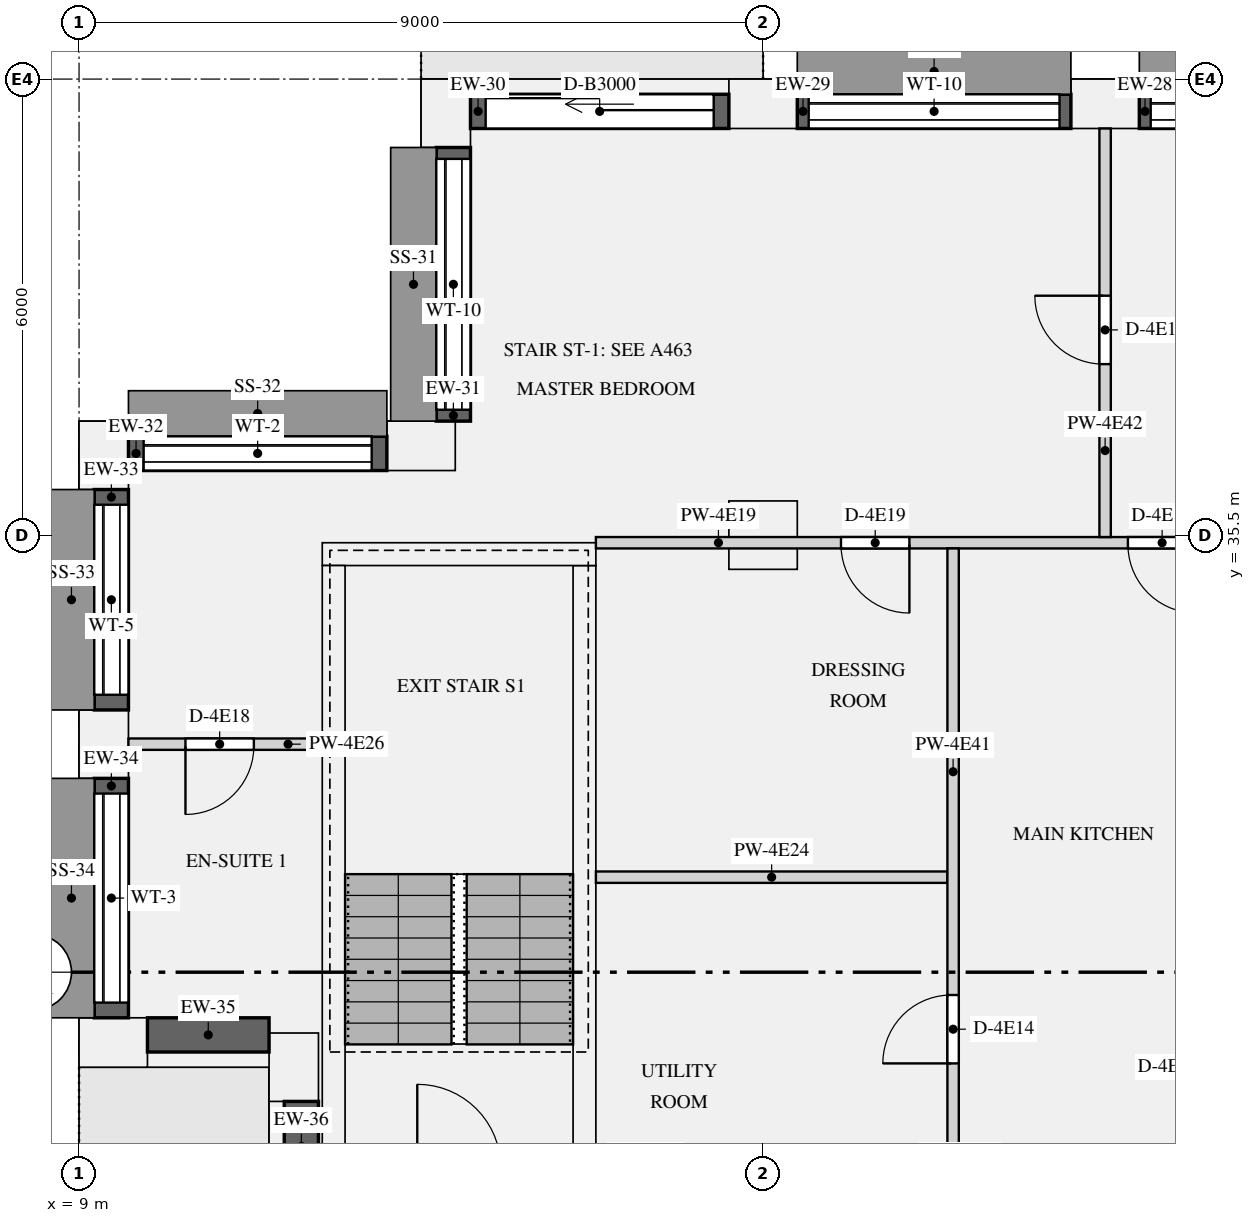
"""IFC4 building model, lengths in metres.
Left out: names, types, materials, properties, quantities, classifications, styles, units other than length and angle.
Written with IfcOpenShell. Run it as: python <this file> out.ifc"""

import sys

from ifc_helpers import new_model, si_unit, direction, frame, frame_2d, origin, origin_2d, place, context, subcontext, project, spatial, rectangle, extrude, element, fill, save


model = new_model("IFC4")
c1 = context("Model", 3, precision=1e-05, world=origin(), true_north=direction((0.0, 1.0)))
c2 = subcontext(c1, "Body", "Model", "MODEL_VIEW")
j1 = project(units=[si_unit("LENGTHUNIT", "METRE"), si_unit("PLANEANGLEUNIT", "RADIAN")], contexts=[c1])
p1 = place(None, origin())
s1 = spatial("IfcSite", under=j1, at=p1, CompositionType="ELEMENT")
p2 = place(p1, origin())
s2 = spatial("IfcBuilding", under=s1, at=p2, CompositionType="ELEMENT")
p3 = place(p2, frame((0.0, 0.0, 232.65)))
s3 = spatial("IfcBuildingStorey", under=s2, at=p3, CompositionType="ELEMENT", Elevation=232.65)
for number, where, z_axis, x_axis in (
    (1, (22.5, 41.175, 0.0), (0.0, 0.0, 1.0), (-1.0, 0.0, 0.0)),
    (2, (18.0, 41.175, 0.0), (0.0, 0.0, 1.0), (-1.0, 0.0, 0.0)),
    (3, (13.825, 41.05, 0.0), (0.0, 0.0, 1.0), (0.0, -1.0, 0.0)),
    (4, (13.5, 36.675, 0.0), (0.0, 0.0, 1.0), (-1.0, 0.0, 0.0)),
    (5, (9.325, 36.55, 0.0), (0.0, 0.0, 1.0), (0.0, -1.0, 0.0)),
    (6, (9.325, 32.75, 0.0), (0.0, 0.0, 1.0), (0.0, -1.0, 0.0)),
    (7, (9.45, 28.825, 0.0), (0.0, 0.0, 1.0), (1.0, 0.0, 0.0)),
    (8, (11.825, 28.5, 0.0), (0.0, 0.0, 1.0), (0.0, -1.0, 0.0)),
):
    element("IfcColumn", number, at=place(p3, frame(where, z_axis=z_axis, x_axis=x_axis)), inside=s3, PredefinedType="USERDEFINED", context=c2, shape_type="SweptSolid", body=[
        extrude(rectangle(XDim=0.9, YDim=0.65, at=origin_2d()), origin(), (0.0, 0.0, 1.0), 3.15),
    ])
p4 = place(p3, frame((18.0, 35.5, 0.0), z_axis=(0.0, 0.0, 1.0), x_axis=(1.0, 0.0, 0.0)))
e9 = element("IfcColumn", 9, at=p4, inside=s3, PredefinedType="COLUMN", context=c2, shape_type="SweptSolid", body=[
    extrude(rectangle(XDim=0.9, YDim=0.9, at=origin_2d()), origin(), (0.0, 0.0, 1.0), 3.15),
])
p5 = place(p3, frame((12.2, 35.25, 0.0), z_axis=(0.0, 0.0, 1.0), x_axis=(1.0, 0.0, 0.0)))
e10 = element("IfcWall", 10, at=p5, inside=s3, PredefinedType="SHEAR", context=c2, shape_type="SweptSolid", body=[
    extrude(rectangle(XDim=3.6, YDim=0.3, at=frame_2d((1.8, 0.0))), origin(), (0.0, 0.0, 1.0), 3.15),
])
for number, where, z_axis, x_axis in (
    (11, (12.35, 27.3, 0.0), (0.0, 0.0, 1.0), (0.0, 1.0, 0.0)),
    (12, (15.65, 27.3, 0.0), (0.0, 0.0, 1.0), (0.0, 1.0, 0.0)),
):
    element("IfcWall", number, at=place(p3, frame(where, z_axis=z_axis, x_axis=x_axis)), inside=s3, PredefinedType="SHEAR", context=c2, shape_type="SweptSolid", body=[
        extrude(rectangle(XDim=7.8, YDim=0.3, at=frame_2d((3.9, 0.0))), origin(), (0.0, 0.0, 1.0), 3.15),
    ])
p6 = place(p3, frame((26.55, 41.075, 0.9), z_axis=(0.0, 0.0, 1.0), x_axis=(-1.0, 0.0, 0.0)))
e13 = element("IfcWall", 13, at=p6, inside=s3, PredefinedType="SOLIDWALL", context=c2, shape_type="SweptSolid", body=[
    extrude(rectangle(XDim=3.6, YDim=0.45, at=frame_2d((1.8, 0.0))), origin(), (0.0, 0.0, 1.0), 1.9),
])
p7 = place(p6, frame((0.15, 0.0, 0.15)))
e14 = element("IfcOpeningElement", 14, at=p7, cuts=e13, PredefinedType="OPENING", context=c2, shape_type="SweptSolid", body=[
    extrude(rectangle(XDim=3.3, YDim=1.5, at=frame_2d((1.65, 0.75))), frame((0.0, 0.235, 0.0), z_axis=(0.0, -1.0, 0.0), x_axis=(1.0, 0.0, 0.0)), (0.0, 0.0, 1.0), 0.47),
])
p8 = place(p3, frame((22.05, 41.075, 0.9), z_axis=(0.0, 0.0, 1.0), x_axis=(-1.0, 0.0, 0.0)))
e15 = element("IfcWall", 15, at=p8, inside=s3, PredefinedType="SOLIDWALL", context=c2, shape_type="SweptSolid", body=[
    extrude(rectangle(XDim=3.6, YDim=0.45, at=frame_2d((1.8, 0.0))), origin(), (0.0, 0.0, 1.0), 1.9),
])
p9 = place(p8, frame((0.15, 0.0, 0.15)))
e16 = element("IfcOpeningElement", 16, at=p9, cuts=e15, PredefinedType="OPENING", context=c2, shape_type="SweptSolid", body=[
    extrude(rectangle(XDim=3.3, YDim=1.5, at=frame_2d((1.65, 0.75))), frame((0.0, 0.235, 0.0), z_axis=(0.0, -1.0, 0.0), x_axis=(1.0, 0.0, 0.0)), (0.0, 0.0, 1.0), 0.47),
])
p10 = place(p3, frame((17.55, 41.075, 0.0), z_axis=(0.0, 0.0, 1.0), x_axis=(-1.0, 0.0, 0.0)))
e17 = element("IfcWall", 17, at=p10, inside=s3, PredefinedType="SOLIDWALL", context=c2, shape_type="SweptSolid", body=[
    extrude(rectangle(XDim=3.4, YDim=0.45, at=frame_2d((1.7, 0.0))), origin(), (0.0, 0.0, 1.0), 2.8),
])
p11 = place(p10, frame((0.2, 0.0, 0.0)))
e18 = element("IfcOpeningElement", 18, at=p11, cuts=e17, PredefinedType="OPENING", context=c2, shape_type="SweptSolid", body=[
    extrude(rectangle(XDim=3.0, YDim=2.3, at=frame_2d((1.5, 1.15))), frame((0.0, 0.235, 0.0), z_axis=(0.0, -1.0, 0.0), x_axis=(1.0, 0.0, 0.0)), (0.0, 0.0, 1.0), 0.47),
])
p12 = place(p3, frame((13.925, 40.6, 0.9), z_axis=(0.0, 0.0, 1.0), x_axis=(0.0, -1.0, 0.0)))
e19 = element("IfcWall", 19, at=p12, inside=s3, PredefinedType="SOLIDWALL", context=c2, shape_type="SweptSolid", body=[
    extrude(rectangle(XDim=3.6, YDim=0.45, at=frame_2d((1.8, 0.0))), origin(), (0.0, 0.0, 1.0), 1.9),
])
p13 = place(p12, frame((0.15, 0.0, 0.15)))
e20 = element("IfcOpeningElement", 20, at=p13, cuts=e19, PredefinedType="OPENING", context=c2, shape_type="SweptSolid", body=[
    extrude(rectangle(XDim=3.3, YDim=1.5, at=frame_2d((1.65, 0.75))), frame((0.0, 0.235, 0.0), z_axis=(0.0, -1.0, 0.0), x_axis=(1.0, 0.0, 0.0)), (0.0, 0.0, 1.0), 0.47),
])
p14 = place(p3, frame((13.05, 36.575, 0.9), z_axis=(0.0, 0.0, 1.0), x_axis=(-1.0, 0.0, 0.0)))
e21 = element("IfcWall", 21, at=p14, inside=s3, PredefinedType="SOLIDWALL", context=c2, shape_type="SweptSolid", body=[
    extrude(rectangle(XDim=3.4, YDim=0.45, at=frame_2d((1.7, 0.0))), origin(), (0.0, 0.0, 1.0), 1.9),
])
p15 = place(p14, frame((0.2, 0.0, 0.15)))
e22 = element("IfcOpeningElement", 22, at=p15, cuts=e21, PredefinedType="OPENING", context=c2, shape_type="SweptSolid", body=[
    extrude(rectangle(XDim=3.0, YDim=1.5, at=frame_2d((1.5, 0.75))), frame((0.0, 0.235, 0.0), z_axis=(0.0, -1.0, 0.0), x_axis=(1.0, 0.0, 0.0)), (0.0, 0.0, 1.0), 0.47),
])
p16 = place(p3, frame((9.425, 36.1, 0.9), z_axis=(0.0, 0.0, 1.0), x_axis=(0.0, -1.0, 0.0)))
e23 = element("IfcWall", 23, at=p16, inside=s3, PredefinedType="SOLIDWALL", context=c2, shape_type="SweptSolid", body=[
    extrude(rectangle(XDim=2.9, YDim=0.45, at=frame_2d((1.45, 0.0))), origin(), (0.0, 0.0, 1.0), 1.9),
])
p17 = place(p16, frame((0.2, 0.0, 0.15)))
e24 = element("IfcOpeningElement", 24, at=p17, cuts=e23, PredefinedType="OPENING", context=c2, shape_type="SweptSolid", body=[
    extrude(rectangle(XDim=2.5, YDim=1.5, at=frame_2d((1.25, 0.75))), frame((0.0, 0.235, 0.0), z_axis=(0.0, -1.0, 0.0), x_axis=(1.0, 0.0, 0.0)), (0.0, 0.0, 1.0), 0.47),
])
p18 = place(p3, frame((9.425, 32.3, 0.9), z_axis=(0.0, 0.0, 1.0), x_axis=(0.0, -1.0, 0.0)))
e25 = element("IfcWall", 25, at=p18, inside=s3, PredefinedType="SOLIDWALL", context=c2, shape_type="SweptSolid", body=[
    extrude(rectangle(XDim=3.15, YDim=0.45, at=frame_2d((1.575, 0.0))), origin(), (0.0, 0.0, 1.0), 1.9),
])
p19 = place(p18, frame((0.2, 0.0, 0.15)))
e26 = element("IfcOpeningElement", 26, at=p19, cuts=e25, PredefinedType="OPENING", context=c2, shape_type="SweptSolid", body=[
    extrude(rectangle(XDim=2.75, YDim=1.5, at=frame_2d((1.375, 0.75))), frame((0.0, 0.235, 0.0), z_axis=(0.0, -1.0, 0.0), x_axis=(1.0, 0.0, 0.0)), (0.0, 0.0, 1.0), 0.47),
])
p20 = place(p3, frame((9.9, 28.925, 0.9), z_axis=(0.0, 0.0, 1.0), x_axis=(1.0, 0.0, 0.0)))
e27 = element("IfcWall", 27, at=p20, inside=s3, PredefinedType="SOLIDWALL", context=c2, shape_type="SweptSolid", body=[
    extrude(rectangle(XDim=1.6, YDim=0.45, at=frame_2d((0.8, 0.0))), origin(), (0.0, 0.0, 1.0), 1.9),
])
p21 = place(p3, frame((11.925, 28.05, 0.0), z_axis=(0.0, 0.0, 1.0), x_axis=(0.0, -1.0, 0.0)))
e28 = element("IfcWall", 28, at=p21, inside=s3, PredefinedType="SOLIDWALL", context=c2, shape_type="SweptSolid", body=[
    extrude(rectangle(XDim=3.1, YDim=0.45, at=frame_2d((1.55, 0.0))), origin(), (0.0, 0.0, 1.0), 2.8),
])
p22 = place(p21, frame((1.185, 0.0, 0.0)))
e29 = element("IfcOpeningElement", 29, at=p22, cuts=e28, PredefinedType="OPENING", context=c2, shape_type="SweptSolid", body=[
    extrude(rectangle(XDim=1.75, YDim=2.3, at=frame_2d((0.875, 1.15))), frame((0.0, 0.235, 0.0), z_axis=(0.0, -1.0, 0.0), x_axis=(1.0, 0.0, 0.0)), (0.0, 0.0, 1.0), 0.47),
])
p23 = place(p3, frame((15.8, 35.4, 0.0), z_axis=(0.0, 0.0, 1.0), x_axis=(1.0, 0.0, 0.0)))
e30 = element("IfcWall", 30, at=p23, inside=s3, PredefinedType="PARTITIONING", context=c2, shape_type="SweptSolid", body=[
    extrude(rectangle(XDim=11.2, YDim=0.15, at=frame_2d((5.6, 0.0))), origin(), (0.0, 0.0, 1.0), 2.8),
])
p24 = place(p23, frame((8.725, 0.0, 0.0)))
e31 = element("IfcOpeningElement", 31, at=p24, cuts=e30, PredefinedType="OPENING", context=c2, shape_type="SweptSolid", body=[
    extrude(rectangle(XDim=1.5, YDim=2.1, at=frame_2d((0.75, 1.05))), frame((0.0, 0.085, 0.0), z_axis=(0.0, -1.0, 0.0), x_axis=(1.0, 0.0, 0.0)), (0.0, 0.0, 1.0), 0.17),
])
p25 = place(p23, frame((7.0, 0.0, 0.0)))
e32 = element("IfcOpeningElement", 32, at=p25, cuts=e30, PredefinedType="OPENING", context=c2, shape_type="SweptSolid", body=[
    extrude(rectangle(XDim=0.9, YDim=2.1, at=frame_2d((0.45, 1.05))), frame((0.0, 0.085, 0.0), z_axis=(0.0, -1.0, 0.0), x_axis=(1.0, 0.0, 0.0)), (0.0, 0.0, 1.0), 0.17),
])
p26 = place(p23, frame((3.225, 0.0, 0.0)))
e33 = element("IfcOpeningElement", 33, at=p26, cuts=e30, PredefinedType="OPENING", context=c2, shape_type="SweptSolid", body=[
    extrude(rectangle(XDim=0.9, YDim=2.1, at=frame_2d((0.45, 1.05))), frame((0.0, 0.085, 0.0), z_axis=(0.0, -1.0, 0.0), x_axis=(1.0, 0.0, 0.0)), (0.0, 0.0, 1.0), 0.17),
])
p27 = place(p3, frame((15.8, 31.0, 0.0), z_axis=(0.0, 0.0, 1.0), x_axis=(1.0, 0.0, 0.0)))
e34 = element("IfcWall", 34, at=p27, inside=s3, PredefinedType="PARTITIONING", context=c2, shape_type="SweptSolid", body=[
    extrude(rectangle(XDim=4.625, YDim=0.15, at=frame_2d((2.312, 0.0))), origin(), (0.0, 0.0, 1.0), 2.8),
])
p28 = place(p3, frame((9.65, 32.75, 0.0), z_axis=(0.0, 0.0, 1.0), x_axis=(1.0, 0.0, 0.0)))
e35 = element("IfcWall", 35, at=p28, inside=s3, PredefinedType="PARTITIONING", context=c2, shape_type="SweptSolid", body=[
    extrude(rectangle(XDim=2.55, YDim=0.15, at=frame_2d((1.275, 0.0))), origin(), (0.0, 0.0, 1.0), 2.8),
])
p29 = place(p28, frame((0.75, 0.0, 0.0)))
e36 = element("IfcOpeningElement", 36, at=p29, cuts=e35, PredefinedType="OPENING", context=c2, shape_type="SweptSolid", body=[
    extrude(rectangle(XDim=0.9, YDim=2.1, at=frame_2d((0.45, 1.05))), frame((0.0, 0.085, 0.0), z_axis=(0.0, -1.0, 0.0), x_axis=(1.0, 0.0, 0.0)), (0.0, 0.0, 1.0), 0.17),
])
p30 = place(p3, frame((20.5, 27.1, 0.0), z_axis=(0.0, 0.0, 1.0), x_axis=(0.0, 1.0, 0.0)))
e37 = element("IfcWall", 37, at=p30, inside=s3, PredefinedType="PARTITIONING", context=c2, shape_type="SweptSolid", body=[
    extrude(rectangle(XDim=8.225, YDim=0.15, at=frame_2d((4.112, 0.0))), origin(), (0.0, 0.0, 1.0), 2.8),
])
p31 = place(p30, frame((1.45, 0.0, 0.0)))
e38 = element("IfcOpeningElement", 38, at=p31, cuts=e37, PredefinedType="OPENING", context=c2, shape_type="SweptSolid", body=[
    extrude(rectangle(XDim=0.9, YDim=2.1, at=frame_2d((0.45, 1.05))), frame((0.0, 0.085, 0.0), z_axis=(0.0, -1.0, 0.0), x_axis=(1.0, 0.0, 0.0)), (0.0, 0.0, 1.0), 0.17),
])
p32 = place(p3, frame((22.5, 35.475, 0.0), z_axis=(0.0, 0.0, 1.0), x_axis=(0.0, 1.0, 0.0)))
e39 = element("IfcWall", 39, at=p32, inside=s3, PredefinedType="PARTITIONING", context=c2, shape_type="SweptSolid", body=[
    extrude(rectangle(XDim=5.375, YDim=0.15, at=frame_2d((2.688, 0.0))), origin(), (0.0, 0.0, 1.0), 2.8),
])
p33 = place(p32, frame((2.275, 0.0, 0.0)))
e40 = element("IfcOpeningElement", 40, at=p33, cuts=e39, PredefinedType="OPENING", context=c2, shape_type="SweptSolid", body=[
    extrude(rectangle(XDim=0.9, YDim=2.1, at=frame_2d((0.45, 1.05))), frame((0.0, 0.085, 0.0), z_axis=(0.0, -1.0, 0.0), x_axis=(1.0, 0.0, 0.0)), (0.0, 0.0, 1.0), 0.17),
])
p34 = place(p7, origin())
e41 = element("IfcWindow", 41, at=p34, inside=s3, PartitioningType="SINGLE_PANEL", PredefinedType="WINDOW", context=c2, shape_type="SweptSolid", body=[
    extrude(rectangle(XDim=3.3, YDim=1.5, at=frame_2d((1.65, 0.75))), frame((0.0, -0.065, 0.0), z_axis=(0.0, -1.0, 0.0), x_axis=(1.0, 0.0, 0.0)), (0.0, 0.0, 1.0), 0.06),
])
fill(e14, e41)
p35 = place(p9, origin())
e42 = element("IfcWindow", 42, at=p35, inside=s3, PartitioningType="SINGLE_PANEL", PredefinedType="WINDOW", context=c2, shape_type="SweptSolid", body=[
    extrude(rectangle(XDim=3.3, YDim=1.5, at=frame_2d((1.65, 0.75))), frame((0.0, -0.065, 0.0), z_axis=(0.0, -1.0, 0.0), x_axis=(1.0, 0.0, 0.0)), (0.0, 0.0, 1.0), 0.06),
])
fill(e16, e42)
p36 = place(p11, origin())
e43 = element("IfcDoor", 43, at=p36, inside=s3, OperationType="SLIDING_TO_LEFT", PredefinedType="DOOR", context=c2, shape_type="SweptSolid", body=[
    extrude(rectangle(XDim=3.0, YDim=2.3, at=frame_2d((1.5, 1.15))), frame((0.0, -0.07, 0.0), z_axis=(0.0, -1.0, 0.0), x_axis=(1.0, 0.0, 0.0)), (0.0, 0.0, 1.0), 0.05),
])
fill(e18, e43)
p37 = place(p13, origin())
e44 = element("IfcWindow", 44, at=p37, inside=s3, PartitioningType="SINGLE_PANEL", PredefinedType="WINDOW", context=c2, shape_type="SweptSolid", body=[
    extrude(rectangle(XDim=3.3, YDim=1.5, at=frame_2d((1.65, 0.75))), frame((0.0, -0.065, 0.0), z_axis=(0.0, -1.0, 0.0), x_axis=(1.0, 0.0, 0.0)), (0.0, 0.0, 1.0), 0.06),
])
fill(e20, e44)
p38 = place(p15, origin())
e45 = element("IfcWindow", 45, at=p38, inside=s3, PartitioningType="SINGLE_PANEL", PredefinedType="WINDOW", context=c2, shape_type="SweptSolid", body=[
    extrude(rectangle(XDim=3.0, YDim=1.5, at=frame_2d((1.5, 0.75))), frame((0.0, -0.065, 0.0), z_axis=(0.0, -1.0, 0.0), x_axis=(1.0, 0.0, 0.0)), (0.0, 0.0, 1.0), 0.06),
])
fill(e22, e45)
p39 = place(p17, origin())
e46 = element("IfcWindow", 46, at=p39, inside=s3, PartitioningType="SINGLE_PANEL", PredefinedType="WINDOW", context=c2, shape_type="SweptSolid", body=[
    extrude(rectangle(XDim=2.5, YDim=1.5, at=frame_2d((1.25, 0.75))), frame((0.0, -0.065, 0.0), z_axis=(0.0, -1.0, 0.0), x_axis=(1.0, 0.0, 0.0)), (0.0, 0.0, 1.0), 0.06),
])
fill(e24, e46)
p40 = place(p19, origin())
e47 = element("IfcWindow", 47, at=p40, inside=s3, PartitioningType="SINGLE_PANEL", PredefinedType="WINDOW", context=c2, shape_type="SweptSolid", body=[
    extrude(rectangle(XDim=2.75, YDim=1.5, at=frame_2d((1.375, 0.75))), frame((0.0, -0.065, 0.0), z_axis=(0.0, -1.0, 0.0), x_axis=(1.0, 0.0, 0.0)), (0.0, 0.0, 1.0), 0.06),
])
fill(e26, e47)
p41 = place(p31, origin())
e48 = element("IfcDoor", 48, at=p41, inside=s3, OperationType="SINGLE_SWING_LEFT", PredefinedType="DOOR", context=c2, shape_type="SweptSolid", body=[
    extrude(rectangle(XDim=0.9, YDim=2.1, at=frame_2d((0.45, 1.05))), frame((0.0, 0.025, 0.0), z_axis=(0.0, -1.0, 0.0), x_axis=(1.0, 0.0, 0.0)), (0.0, 0.0, 1.0), 0.05),
])
fill(e38, e48)
p42 = place(p25, frame((0.9, 0.0, 0.0), z_axis=(0.0, 0.0, 1.0), x_axis=(-1.0, 0.0, 0.0)))
e49 = element("IfcDoor", 49, at=p42, inside=s3, OperationType="SINGLE_SWING_LEFT", PredefinedType="DOOR", context=c2, shape_type="SweptSolid", body=[
    extrude(rectangle(XDim=0.9, YDim=2.1, at=frame_2d((0.45, 1.05))), frame((0.0, 0.025, 0.0), z_axis=(0.0, -1.0, 0.0), x_axis=(1.0, 0.0, 0.0)), (0.0, 0.0, 1.0), 0.05),
])
fill(e32, e49)
p43 = place(p33, origin())
e50 = element("IfcDoor", 50, at=p43, inside=s3, OperationType="SINGLE_SWING_RIGHT", PredefinedType="DOOR", context=c2, shape_type="SweptSolid", body=[
    extrude(rectangle(XDim=0.9, YDim=2.1, at=frame_2d((0.45, 1.05))), frame((0.0, 0.025, 0.0), z_axis=(0.0, -1.0, 0.0), x_axis=(1.0, 0.0, 0.0)), (0.0, 0.0, 1.0), 0.05),
])
fill(e40, e50)
p44 = place(p29, frame((0.9, 0.0, 0.0), z_axis=(0.0, 0.0, 1.0), x_axis=(-1.0, 0.0, 0.0)))
e51 = element("IfcDoor", 51, at=p44, inside=s3, OperationType="SINGLE_SWING_RIGHT", PredefinedType="DOOR", context=c2, shape_type="SweptSolid", body=[
    extrude(rectangle(XDim=0.9, YDim=2.1, at=frame_2d((0.45, 1.05))), frame((0.0, 0.025, 0.0), z_axis=(0.0, -1.0, 0.0), x_axis=(1.0, 0.0, 0.0)), (0.0, 0.0, 1.0), 0.05),
])
fill(e36, e51)
p45 = place(p26, frame((0.9, 0.0, 0.0), z_axis=(0.0, 0.0, 1.0), x_axis=(-1.0, 0.0, 0.0)))
e52 = element("IfcDoor", 52, at=p45, inside=s3, OperationType="SINGLE_SWING_LEFT", PredefinedType="DOOR", context=c2, shape_type="SweptSolid", body=[
    extrude(rectangle(XDim=0.9, YDim=2.1, at=frame_2d((0.45, 1.05))), frame((0.0, 0.025, 0.0), z_axis=(0.0, -1.0, 0.0), x_axis=(1.0, 0.0, 0.0)), (0.0, 0.0, 1.0), 0.05),
])
fill(e33, e52)
save(model, sys.argv[1])
